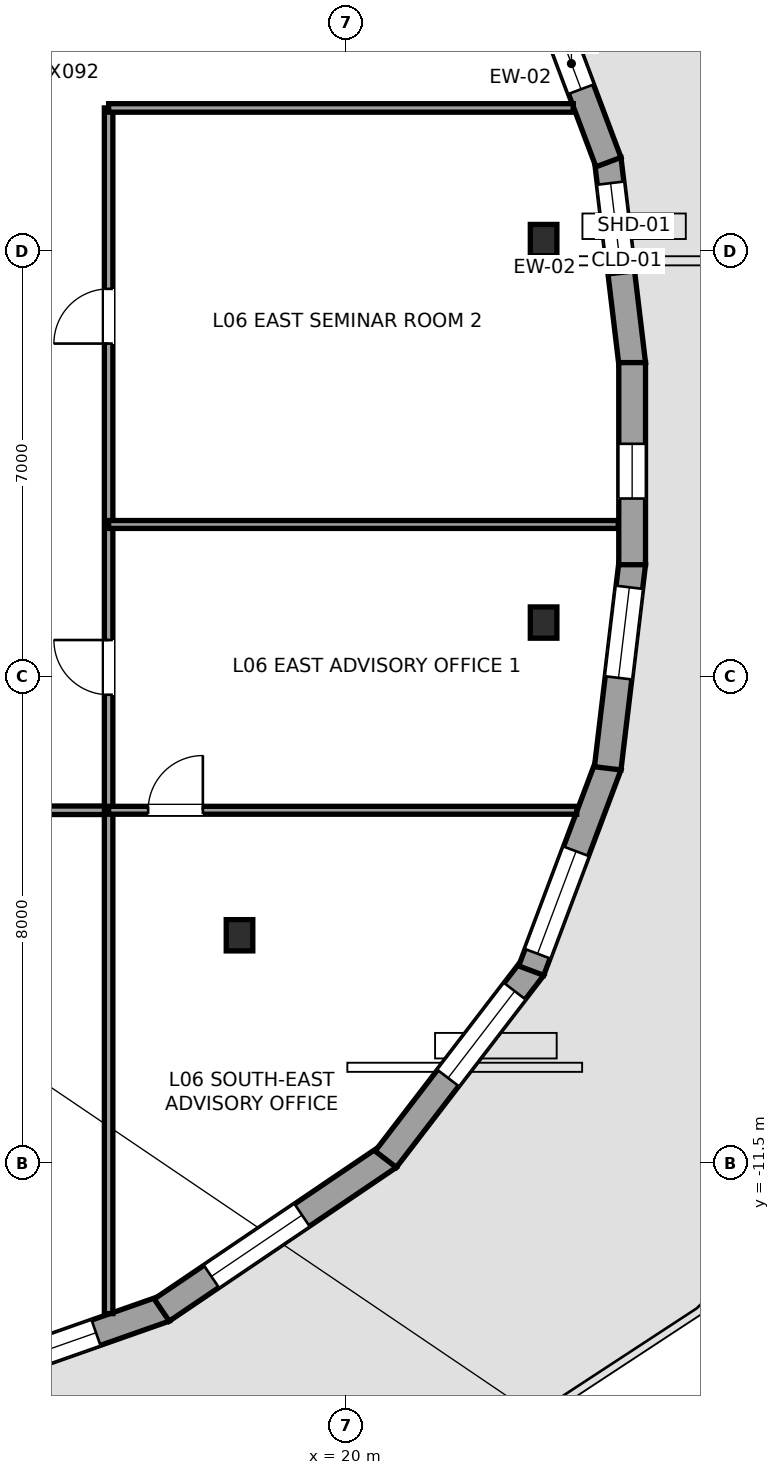
"""IFC4 building model, lengths in metres.
Left out: names, types, materials, properties, quantities, classifications, styles, units other than length and angle.
Written with IfcOpenShell. Run it as: python <this file> out.ifc"""

import sys

from ifc_helpers import new_model, si_unit, direction, frame, frame_2d, origin, origin_2d, place, context, subcontext, project, spatial, rectangle, i_section, extrude, element, fill, save


model = new_model("IFC4")
c1 = context("Model", 3, precision=1e-05, world=origin(), true_north=direction((0.0, 1.0)))
c2 = subcontext(c1, "Body", "Model", "MODEL_VIEW")
j1 = project(units=[si_unit("LENGTHUNIT", "METRE"), si_unit("PLANEANGLEUNIT", "RADIAN")], contexts=[c1])
p1 = place(None, origin())
s1 = spatial("IfcSite", under=j1, at=p1, CompositionType="ELEMENT")
p2 = place(p1, origin())
s2 = spatial("IfcBuilding", under=s1, at=p2, CompositionType="ELEMENT")
p3 = place(p2, frame((0.0, 0.0, 27.0)))
s3 = spatial("IfcBuildingStorey", under=s2, at=p3, CompositionType="ELEMENT", Elevation=27.0)
for number, where, z_axis, x_axis in (
    (1, (23.254, 3.677, 0.0), (0.0, 0.0, 1.0), (1.0, 0.0, 0.0)),
    (2, (18.253, -7.756, 0.0), (0.0, 0.0, 1.0), (1.0, 0.0, 0.0)),
    (3, (23.254, -2.613, 0.0), (0.0, 0.0, 1.0), (1.0, 0.0, 0.0)),
):
    element("IfcColumn", number, at=place(p3, frame(where, z_axis=z_axis, x_axis=x_axis)), inside=s3, PredefinedType="COLUMN", context=c2, shape_type="SweptSolid", body=[
        extrude(i_section(OverallWidth=0.437, OverallDepth=0.514, WebThickness=0.061, FlangeThickness=0.097, at=origin_2d()), origin(), (0.0, 0.0, 1.0), 3.6),
    ])
p4 = place(p3, frame((24.308, 5.01, 0.0), z_axis=(0.0, 0.0, 1.0), x_axis=(0.118754274869, -0.992923673905, 0.0)))
e4 = element("IfcWall", 4, at=p4, inside=s3, PredefinedType="STANDARD", context=c2, shape_type="SweptSolid", body=[
    extrude(rectangle(XDim=3.398, YDim=0.44, at=frame_2d((1.699, 0.0))), origin(), (0.0, 0.0, 1.0), 2.533),
])
p5 = place(p4, frame((0.4, 0.0, 0.65)))
e5 = element("IfcOpeningElement", 5, at=p5, cuts=e4, PredefinedType="OPENING", context=c2, shape_type="SweptSolid", body=[
    extrude(rectangle(XDim=1.5, YDim=1.7, at=frame_2d((0.75, 0.85))), frame((0.0, 0.23, 0.0), z_axis=(0.0, -1.0, 0.0), x_axis=(1.0, 0.0, 0.0)), (0.0, 0.0, 1.0), 0.46),
])
p6 = place(p3, frame((23.05, 8.337, 0.0), z_axis=(0.0, 0.0, 1.0), x_axis=(0.351960996761, -0.936014666957, 0.0)))
e6 = element("IfcWall", 6, at=p6, inside=s3, PredefinedType="STANDARD", context=c2, shape_type="SweptSolid", body=[
    extrude(rectangle(XDim=3.609, YDim=0.44, at=frame_2d((1.805, 0.0))), origin(), (0.0, 0.0, 1.0), 2.533),
])
p7 = place(p6, frame((1.428, 0.0, 0.58)))
e7 = element("IfcOpeningElement", 7, at=p7, cuts=e6, PredefinedType="OPENING", context=c2, shape_type="SweptSolid", body=[
    extrude(rectangle(XDim=0.9, YDim=1.35, at=frame_2d((0.45, 0.675))), frame((0.0, 0.23, 0.0), z_axis=(0.0, -1.0, 0.0), x_axis=(1.0, 0.0, 0.0)), (0.0, 0.0, 1.0), 0.46),
])
p8 = place(p3, frame((17.023, -13.894, 0.0), z_axis=(0.0, 0.0, 1.0), x_axis=(-0.94336246541, -0.331763860082, 0.0)))
e8 = element("IfcWall", 8, at=p8, inside=s3, PredefinedType="STANDARD", context=c2, shape_type="SweptSolid", body=[
    extrude(rectangle(XDim=4.946, YDim=0.44, at=frame_2d((2.473, 0.0))), origin(), (0.0, 0.0, 1.0), 2.529),
])
p9 = place(p8, frame((1.198, 0.0, 0.65)))
e9 = element("IfcOpeningElement", 9, at=p9, cuts=e8, PredefinedType="OPENING", context=c2, shape_type="SweptSolid", body=[
    extrude(rectangle(XDim=1.8, YDim=1.7, at=frame_2d((0.9, 0.85))), frame((0.0, 0.23, 0.0), z_axis=(0.0, -1.0, 0.0), x_axis=(1.0, 0.0, 0.0)), (0.0, 0.0, 1.0), 0.46),
])
p10 = place(p3, frame((20.709, -11.391, 0.0), z_axis=(0.0, 0.0, 1.0), x_axis=(-0.828124546302, -0.560544142608, 0.0)))
e10 = element("IfcWall", 10, at=p10, inside=s3, PredefinedType="STANDARD", context=c2, shape_type="SweptSolid", body=[
    extrude(rectangle(XDim=4.511, YDim=0.44, at=frame_2d((2.255, 0.0))), origin(), (0.0, 0.0, 1.0), 2.533),
])
p11 = place(p10, frame((1.724, 0.0, 0.65)))
e11 = element("IfcOpeningElement", 11, at=p11, cuts=e10, PredefinedType="OPENING", context=c2, shape_type="SweptSolid", body=[
    extrude(rectangle(XDim=1.8, YDim=1.7, at=frame_2d((0.9, 0.85))), frame((0.0, 0.23, 0.0), z_axis=(0.0, -1.0, 0.0), x_axis=(1.0, 0.0, 0.0)), (0.0, 0.0, 1.0), 0.46),
])
p12 = place(p3, frame((23.082, -8.281, 0.0), z_axis=(0.0, 0.0, 1.0), x_axis=(-0.608803527611, -0.793321035123, 0.0)))
e12 = element("IfcWall", 12, at=p12, inside=s3, PredefinedType="STANDARD", context=c2, shape_type="SweptSolid", body=[
    extrude(rectangle(XDim=3.981, YDim=0.44, at=frame_2d((1.991, 0.0))), origin(), (0.0, 0.0, 1.0), 2.533),
])
p13 = place(p12, frame((0.497, 0.0, 0.65)))
e13 = element("IfcOpeningElement", 13, at=p13, cuts=e12, PredefinedType="OPENING", context=c2, shape_type="SweptSolid", body=[
    extrude(rectangle(XDim=1.8, YDim=1.7, at=frame_2d((0.9, 0.85))), frame((0.0, 0.23, 0.0), z_axis=(0.0, -1.0, 0.0), x_axis=(1.0, 0.0, 0.0)), (0.0, 0.0, 1.0), 0.46),
])
p14 = place(p3, frame((24.321, -4.959, 0.0), z_axis=(0.0, 0.0, 1.0), x_axis=(-0.351960996761, -0.936014666957, 0.0)))
e14 = element("IfcWall", 14, at=p14, inside=s3, PredefinedType="STANDARD", context=c2, shape_type="SweptSolid", body=[
    extrude(rectangle(XDim=3.609, YDim=0.44, at=frame_2d((1.805, 0.0))), origin(), (0.0, 0.0, 1.0), 2.533),
])
p15 = place(p14, frame((1.512, 0.0, 0.65)))
e15 = element("IfcOpeningElement", 15, at=p15, cuts=e14, PredefinedType="OPENING", context=c2, shape_type="SweptSolid", body=[
    extrude(rectangle(XDim=1.8, YDim=1.7, at=frame_2d((0.9, 0.85))), frame((0.0, 0.23, 0.0), z_axis=(0.0, -1.0, 0.0), x_axis=(1.0, 0.0, 0.0)), (0.0, 0.0, 1.0), 0.46),
])
p16 = place(p3, frame((24.712, -1.636, 0.0), z_axis=(0.0, 0.0, 1.0), x_axis=(-0.118754274869, -0.992923673905, 0.0)))
e16 = element("IfcWall", 16, at=p16, inside=s3, PredefinedType="STANDARD", context=c2, shape_type="SweptSolid", body=[
    extrude(rectangle(XDim=3.398, YDim=0.44, at=frame_2d((1.699, 0.0))), origin(), (0.0, 0.0, 1.0), 2.533),
])
p17 = place(p16, frame((0.4, 0.0, 0.65)))
e17 = element("IfcOpeningElement", 17, at=p17, cuts=e16, PredefinedType="OPENING", context=c2, shape_type="SweptSolid", body=[
    extrude(rectangle(XDim=1.5, YDim=1.7, at=frame_2d((0.75, 0.85))), frame((0.0, 0.23, 0.0), z_axis=(0.0, -1.0, 0.0), x_axis=(1.0, 0.0, 0.0)), (0.0, 0.0, 1.0), 0.46),
])
p18 = place(p3, frame((24.71, 1.662, 0.0), z_axis=(0.0, 0.0, 1.0), x_axis=(0.0, -1.0, 0.0)))
e18 = element("IfcWall", 18, at=p18, inside=s3, PredefinedType="STANDARD", context=c2, shape_type="SweptSolid", body=[
    extrude(rectangle(XDim=3.324, YDim=0.44, at=frame_2d((1.662, 0.0))), origin(), (0.0, 0.0, 1.0), 2.533),
])
p19 = place(p18, frame((1.335, 0.0, 0.58)))
e19 = element("IfcOpeningElement", 19, at=p19, cuts=e18, PredefinedType="OPENING", context=c2, shape_type="SweptSolid", body=[
    extrude(rectangle(XDim=0.9, YDim=1.35, at=frame_2d((0.45, 0.675))), frame((0.0, 0.23, 0.0), z_axis=(0.0, -1.0, 0.0), x_axis=(1.0, 0.0, 0.0)), (0.0, 0.0, 1.0), 0.46),
])
p20 = place(p3, frame((-16.1, -5.7, 0.0), z_axis=(0.0, 0.0, 1.0), x_axis=(1.0, 0.0, 0.0)))
e20 = element("IfcWall", 20, at=p20, inside=s3, PredefinedType="PARTITIONING", context=c2, shape_type="SweptSolid", body=[
    extrude(rectangle(XDim=32.2, YDim=0.14, at=frame_2d((16.1, 0.0))), origin(), (0.0, 0.0, 1.0), 2.853),
])
p21 = place(p20, frame((3.6, 0.0, 0.0)))
e21 = element("IfcOpeningElement", 21, at=p21, cuts=e20, PredefinedType="OPENING", context=c2, shape_type="SweptSolid", body=[
    extrude(rectangle(XDim=0.9, YDim=2.1, at=frame_2d((0.45, 1.05))), frame((0.0, 0.08, 0.0), z_axis=(0.0, -1.0, 0.0), x_axis=(1.0, 0.0, 0.0)), (0.0, 0.0, 1.0), 0.16),
])
p22 = place(p20, frame((11.35, 0.0, 0.0)))
e22 = element("IfcOpeningElement", 22, at=p22, cuts=e20, PredefinedType="OPENING", context=c2, shape_type="SweptSolid", body=[
    extrude(rectangle(XDim=1.5, YDim=2.15, at=frame_2d((0.75, 1.075))), frame((0.0, 0.08, 0.0), z_axis=(0.0, -1.0, 0.0), x_axis=(1.0, 0.0, 0.0)), (0.0, 0.0, 1.0), 0.16),
])
p23 = place(p20, frame((19.65, 0.0, 0.0)))
e23 = element("IfcOpeningElement", 23, at=p23, cuts=e20, PredefinedType="OPENING", context=c2, shape_type="SweptSolid", body=[
    extrude(rectangle(XDim=0.9, YDim=2.1, at=frame_2d((0.45, 1.05))), frame((0.0, 0.08, 0.0), z_axis=(0.0, -1.0, 0.0), x_axis=(1.0, 0.0, 0.0)), (0.0, 0.0, 1.0), 0.16),
])
p24 = place(p20, frame((27.7, 0.0, 0.0)))
e24 = element("IfcOpeningElement", 24, at=p24, cuts=e20, PredefinedType="OPENING", context=c2, shape_type="SweptSolid", body=[
    extrude(rectangle(XDim=0.9, YDim=2.1, at=frame_2d((0.45, 1.05))), frame((0.0, 0.08, 0.0), z_axis=(0.0, -1.0, 0.0), x_axis=(1.0, 0.0, 0.0)), (0.0, 0.0, 1.0), 0.16),
])
p25 = place(p3, frame((16.1, -13.977, 0.0), z_axis=(0.0, 0.0, 1.0), x_axis=(0.0, 1.0, 0.0)))
e25 = element("IfcWall", 25, at=p25, inside=s3, PredefinedType="PARTITIONING", context=c2, shape_type="SweptSolid", body=[
    extrude(rectangle(XDim=19.827, YDim=0.14, at=frame_2d((9.914, 0.0))), origin(), (0.0, 0.0, 1.0), 2.841),
])
p26 = place(p25, frame((10.177, 0.0, 0.0)))
e26 = element("IfcOpeningElement", 26, at=p26, cuts=e25, PredefinedType="OPENING", context=c2, shape_type="SweptSolid", body=[
    extrude(rectangle(XDim=0.9, YDim=2.1, at=frame_2d((0.45, 1.05))), frame((0.0, 0.08, 0.0), z_axis=(0.0, -1.0, 0.0), x_axis=(1.0, 0.0, 0.0)), (0.0, 0.0, 1.0), 0.16),
])
p27 = place(p25, frame((15.952, 0.0, 0.0)))
e27 = element("IfcOpeningElement", 27, at=p27, cuts=e25, PredefinedType="OPENING", context=c2, shape_type="SweptSolid", body=[
    extrude(rectangle(XDim=0.9, YDim=2.1, at=frame_2d((0.45, 1.05))), frame((0.0, 0.08, 0.0), z_axis=(0.0, -1.0, 0.0), x_axis=(1.0, 0.0, 0.0)), (0.0, 0.0, 1.0), 0.16),
])
p28 = place(p3, frame((16.1, 5.85, 0.0), z_axis=(0.0, 0.0, 1.0), x_axis=(1.0, 0.0, 0.0)))
e28 = element("IfcWall", 28, at=p28, inside=s3, PredefinedType="PARTITIONING", context=c2, shape_type="SweptSolid", body=[
    extrude(rectangle(XDim=7.642, YDim=0.14, at=frame_2d((3.821, 0.0))), origin(), (0.0, 0.0, 1.0), 3.4),
])
p29 = place(p3, frame((16.1, -5.7, 0.0), z_axis=(0.0, 0.0, 1.0), x_axis=(1.0, 0.0, 0.0)))
e29 = element("IfcWall", 29, at=p29, inside=s3, PredefinedType="PARTITIONING", context=c2, shape_type="SweptSolid", body=[
    extrude(rectangle(XDim=7.698, YDim=0.13, at=frame_2d((3.849, 0.0))), origin(), (0.0, 0.0, 1.0), 2.779),
])
p30 = place(p29, frame((0.65, 0.0, 0.0)))
e30 = element("IfcOpeningElement", 30, at=p30, cuts=e29, PredefinedType="OPENING", context=c2, shape_type="SweptSolid", body=[
    extrude(rectangle(XDim=0.9, YDim=2.1, at=frame_2d((0.45, 1.05))), frame((0.0, 0.075, 0.0), z_axis=(0.0, -1.0, 0.0), x_axis=(1.0, 0.0, 0.0)), (0.0, 0.0, 1.0), 0.15),
])
p31 = place(p3, frame((16.1, -1.0, 0.0), z_axis=(0.0, 0.0, 1.0), x_axis=(1.0, 0.0, 0.0)))
e31 = element("IfcWall", 31, at=p31, inside=s3, PredefinedType="PARTITIONING", context=c2, shape_type="SweptSolid", body=[
    extrude(rectangle(XDim=8.382, YDim=0.13, at=frame_2d((4.191, 0.0))), origin(), (0.0, 0.0, 1.0), 2.841),
])
p32 = place(p5, origin())
e32 = element("IfcWindow", 32, at=p32, inside=s3, PartitioningType="SINGLE_PANEL", PredefinedType="WINDOW", context=c2, shape_type="SweptSolid", body=[
    extrude(rectangle(XDim=1.5, YDim=1.7, at=frame_2d((0.75, 0.85))), frame((0.0, -0.01, 0.0), z_axis=(0.0, -1.0, 0.0), x_axis=(1.0, 0.0, 0.0)), (0.0, 0.0, 1.0), 0.06),
])
fill(e5, e32)
p33 = place(p7, origin())
e33 = element("IfcWindow", 33, at=p33, inside=s3, PartitioningType="SINGLE_PANEL", PredefinedType="WINDOW", context=c2, shape_type="SweptSolid", body=[
    extrude(rectangle(XDim=0.9, YDim=1.35, at=frame_2d((0.45, 0.675))), frame((0.0, -0.01, 0.0), z_axis=(0.0, -1.0, 0.0), x_axis=(1.0, 0.0, 0.0)), (0.0, 0.0, 1.0), 0.06),
])
fill(e7, e33)
p34 = place(p9, origin())
e34 = element("IfcWindow", 34, at=p34, inside=s3, PartitioningType="SINGLE_PANEL", PredefinedType="WINDOW", context=c2, shape_type="SweptSolid", body=[
    extrude(rectangle(XDim=1.8, YDim=1.7, at=frame_2d((0.9, 0.85))), frame((0.0, -0.01, 0.0), z_axis=(0.0, -1.0, 0.0), x_axis=(1.0, 0.0, 0.0)), (0.0, 0.0, 1.0), 0.06),
])
fill(e9, e34)
p35 = place(p11, origin())
e35 = element("IfcWindow", 35, at=p35, inside=s3, PartitioningType="SINGLE_PANEL", PredefinedType="WINDOW", context=c2, shape_type="SweptSolid", body=[
    extrude(rectangle(XDim=1.8, YDim=1.7, at=frame_2d((0.9, 0.85))), frame((0.0, -0.01, 0.0), z_axis=(0.0, -1.0, 0.0), x_axis=(1.0, 0.0, 0.0)), (0.0, 0.0, 1.0), 0.06),
])
fill(e11, e35)
p36 = place(p13, origin())
e36 = element("IfcWindow", 36, at=p36, inside=s3, PartitioningType="SINGLE_PANEL", PredefinedType="WINDOW", context=c2, shape_type="SweptSolid", body=[
    extrude(rectangle(XDim=1.8, YDim=1.7, at=frame_2d((0.9, 0.85))), frame((0.0, -0.01, 0.0), z_axis=(0.0, -1.0, 0.0), x_axis=(1.0, 0.0, 0.0)), (0.0, 0.0, 1.0), 0.06),
])
fill(e13, e36)
p37 = place(p15, origin())
e37 = element("IfcWindow", 37, at=p37, inside=s3, PartitioningType="SINGLE_PANEL", PredefinedType="WINDOW", context=c2, shape_type="SweptSolid", body=[
    extrude(rectangle(XDim=1.8, YDim=1.7, at=frame_2d((0.9, 0.85))), frame((0.0, -0.01, 0.0), z_axis=(0.0, -1.0, 0.0), x_axis=(1.0, 0.0, 0.0)), (0.0, 0.0, 1.0), 0.06),
])
fill(e15, e37)
p38 = place(p17, origin())
e38 = element("IfcWindow", 38, at=p38, inside=s3, PartitioningType="SINGLE_PANEL", PredefinedType="WINDOW", context=c2, shape_type="SweptSolid", body=[
    extrude(rectangle(XDim=1.5, YDim=1.7, at=frame_2d((0.75, 0.85))), frame((0.0, -0.01, 0.0), z_axis=(0.0, -1.0, 0.0), x_axis=(1.0, 0.0, 0.0)), (0.0, 0.0, 1.0), 0.06),
])
fill(e17, e38)
p39 = place(p19, origin())
e39 = element("IfcWindow", 39, at=p39, inside=s3, PartitioningType="SINGLE_PANEL", PredefinedType="WINDOW", context=c2, shape_type="SweptSolid", body=[
    extrude(rectangle(XDim=0.9, YDim=1.35, at=frame_2d((0.45, 0.675))), frame((0.0, -0.01, 0.0), z_axis=(0.0, -1.0, 0.0), x_axis=(1.0, 0.0, 0.0)), (0.0, 0.0, 1.0), 0.06),
])
fill(e19, e39)
p40 = place(p30, origin())
e40 = element("IfcDoor", 40, at=p40, inside=s3, OperationType="SINGLE_SWING_RIGHT", PredefinedType="DOOR", context=c2, shape_type="SweptSolid", body=[
    extrude(rectangle(XDim=0.9, YDim=2.1, at=frame_2d((0.45, 1.05))), frame((0.0, 0.025, 0.0), z_axis=(0.0, -1.0, 0.0), x_axis=(1.0, 0.0, 0.0)), (0.0, 0.0, 1.0), 0.05),
])
fill(e30, e40)
p41 = place(p26, origin())
e41 = element("IfcDoor", 41, at=p41, inside=s3, OperationType="SINGLE_SWING_RIGHT", PredefinedType="DOOR", context=c2, shape_type="SweptSolid", body=[
    extrude(rectangle(XDim=0.9, YDim=2.1, at=frame_2d((0.45, 1.05))), frame((0.0, 0.025, 0.0), z_axis=(0.0, -1.0, 0.0), x_axis=(1.0, 0.0, 0.0)), (0.0, 0.0, 1.0), 0.05),
])
fill(e26, e41)
p42 = place(p27, origin())
e42 = element("IfcDoor", 42, at=p42, inside=s3, OperationType="SINGLE_SWING_LEFT", PredefinedType="DOOR", context=c2, shape_type="SweptSolid", body=[
    extrude(rectangle(XDim=0.9, YDim=2.1, at=frame_2d((0.45, 1.05))), frame((0.0, 0.025, 0.0), z_axis=(0.0, -1.0, 0.0), x_axis=(1.0, 0.0, 0.0)), (0.0, 0.0, 1.0), 0.05),
])
fill(e27, e42)
save(model, sys.argv[1])
